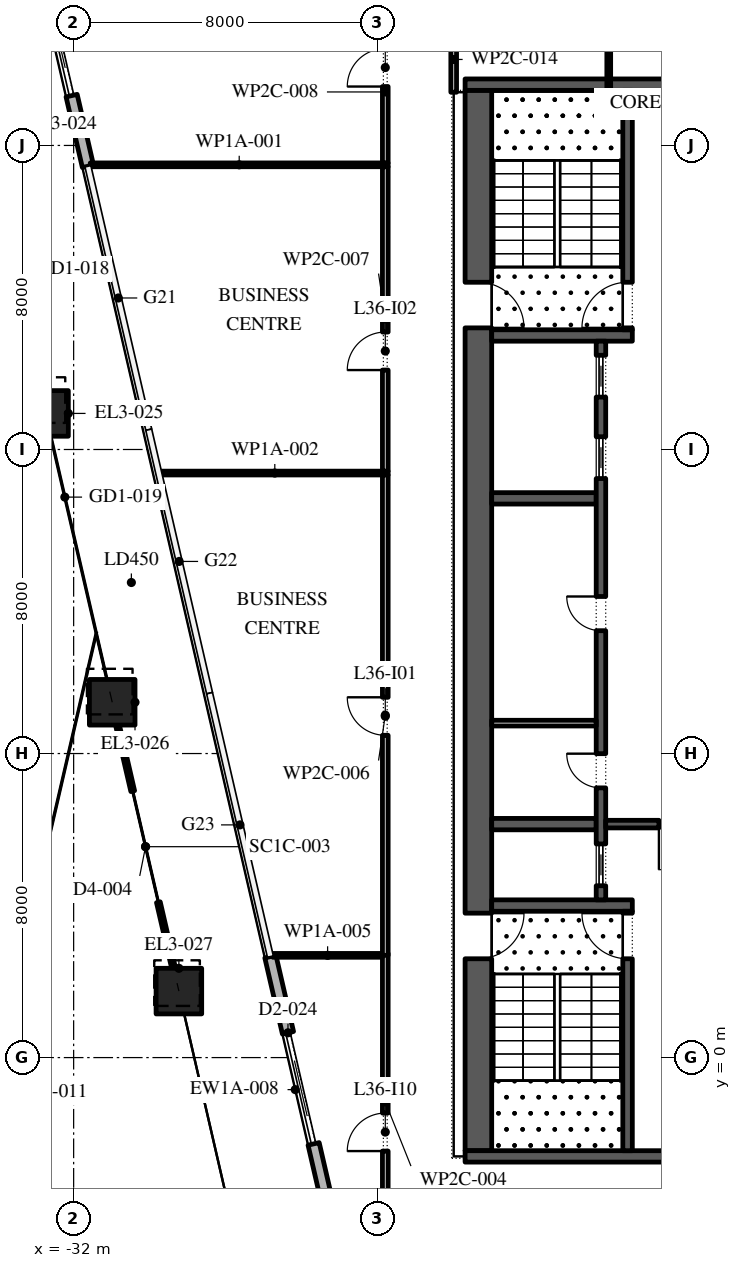
"""IFC4 building model, lengths in metres.
Left out: names, types, materials, properties, quantities, classifications, styles, units other than length and angle.
Written with IfcOpenShell. Run it as: python <this file> out.ifc"""

import sys

from ifc_helpers import new_model, si_unit, direction, frame, frame_2d, origin, origin_2d, place, context, subcontext, project, spatial, rectangle, extrude, element, fill, save


model = new_model("IFC4")
c1 = context("Model", 3, precision=1e-05, world=origin(), true_north=direction((0.0, 1.0)))
c2 = subcontext(c1, "Body", "Model", "MODEL_VIEW")
j1 = project(units=[si_unit("LENGTHUNIT", "METRE"), si_unit("PLANEANGLEUNIT", "RADIAN")], contexts=[c1])
p1 = place(None, origin())
s1 = spatial("IfcSite", under=j1, at=p1, CompositionType="ELEMENT")
p2 = place(p1, origin())
s2 = spatial("IfcBuilding", under=s1, at=p2, CompositionType="ELEMENT")
p3 = place(p2, frame((0.0, 0.0, 165.6)))
s3 = spatial("IfcBuildingStorey", under=s2, at=p3, CompositionType="ELEMENT", Elevation=165.6)
p4 = place(p3, frame((-32.74, 16.949, 0.0), z_axis=(-0.013484854004, 0.058366672302, 0.998204132569), x_axis=(-0.974334026589, -0.225107095913, 0.0)))
e1 = element("IfcColumn", 1, at=p4, inside=s3, PredefinedType="COLUMN", context=c2, shape_type="SweptSolid", body=[
    extrude(rectangle(XDim=1.2, YDim=1.2, at=origin_2d()), origin(), (0.0, 0.0, 1.0), 6.011),
])
p5 = place(p3, frame((-30.985, 9.349, 0.0), z_axis=(-0.010811105403, 0.046739741404, 0.99884859542), x_axis=(-0.974276841123, -0.225354469338, 0.0)))
e2 = element("IfcColumn", 2, at=p5, inside=s3, PredefinedType="COLUMN", context=c2, shape_type="SweptSolid", body=[
    extrude(rectangle(XDim=1.2, YDim=1.2, at=origin_2d()), origin(), (0.0, 0.0, 1.0), 6.007),
])
p6 = place(p3, frame((-29.231, 1.749, 0.0), z_axis=(-0.008092089508, 0.035052166613, 0.999352722367), x_axis=(-0.974372141151, -0.224942060428, 0.0)))
e3 = element("IfcColumn", 3, at=p6, inside=s3, PredefinedType="COLUMN", context=c2, shape_type="SweptSolid", body=[
    extrude(rectangle(XDim=1.2, YDim=1.2, at=origin_2d()), origin(), (0.0, 0.0, 1.0), 6.004),
])
p7 = place(p3, frame((-33.157, 30.092, 0.0), z_axis=(0.0, 0.0, 1.0), x_axis=(0.224961553766, -0.974367640743, 0.0)))
e4 = element("IfcWall", 4, at=p7, inside=s3, PredefinedType="STANDARD", context=c2, shape_type="SweptSolid", body=[
    extrude(rectangle(XDim=6.814, YDim=0.3, at=frame_2d((3.407, 0.0))), origin(), (0.0, 0.0, 1.0), 5.8),
])
p8 = place(p7, frame((1.907, 0.0, 0.0)))
e5 = element("IfcOpeningElement", 5, at=p8, cuts=e4, PredefinedType="OPENING", context=c2, shape_type="SweptSolid", body=[
    extrude(rectangle(XDim=3.0, YDim=3.5, at=frame_2d((1.5, 1.75))), frame((0.0, 0.16, 0.0), z_axis=(0.0, -1.0, 0.0), x_axis=(1.0, 0.0, 0.0)), (0.0, 0.0, 1.0), 0.32),
])
p9 = place(p3, frame((-26.823, 2.657, 0.0), z_axis=(0.0, 0.0, 1.0), x_axis=(0.22494221161, -0.974372106249, 0.0)))
e6 = element("IfcWall", 6, at=p9, inside=s3, PredefinedType="STANDARD", context=c2, shape_type="SweptSolid", body=[
    extrude(rectangle(XDim=7.115, YDim=0.3, at=frame_2d((3.557, 0.0))), origin(), (0.0, 0.0, 1.0), 5.8),
])
p10 = place(p9, frame((2.057, 0.0, 0.0)))
e7 = element("IfcOpeningElement", 7, at=p10, cuts=e6, PredefinedType="OPENING", context=c2, shape_type="SweptSolid", body=[
    extrude(rectangle(XDim=3.0, YDim=3.5, at=frame_2d((1.5, 1.75))), frame((0.0, 0.16, 0.0), z_axis=(0.0, -1.0, 0.0), x_axis=(1.0, 0.0, 0.0)), (0.0, 0.0, 1.0), 0.32),
])
p11 = place(p3, frame((-30.846, 8.745, 0.0), z_axis=(0.0, 0.0, 1.0), x_axis=(0.224973663593, -0.974364844752, 0.0)))
e8 = element("IfcWall", 8, at=p11, inside=s3, PredefinedType="STANDARD", context=c2, shape_type="SweptSolid", body=[
    extrude(rectangle(XDim=6.56, YDim=0.1, at=frame_2d((3.28, 0.0))), origin(), (0.0, 0.0, 1.0), 4.85),
])
p12 = place(p11, frame((1.78, 0.0, 0.0)))
e9 = element("IfcOpeningElement", 9, at=p12, cuts=e8, PredefinedType="OPENING", context=c2, shape_type="SweptSolid", body=[
    extrude(rectangle(XDim=3.0, YDim=3.5, at=frame_2d((1.5, 1.75))), frame((0.0, 0.06, 0.0), z_axis=(0.0, -1.0, 0.0), x_axis=(1.0, 0.0, 0.0)), (0.0, 0.0, 1.0), 0.12),
])
p13 = place(p3, frame((-21.35, -2.45, 0.0), z_axis=(0.0, 0.0, 1.0), x_axis=(0.0, 1.0, 0.0)))
e10 = element("IfcWall", 10, at=p13, inside=s3, PredefinedType="SHEAR", context=c2, shape_type="SweptSolid", body=[
    extrude(rectangle(XDim=27.9, YDim=0.7, at=frame_2d((13.95, 0.0))), origin(), (0.0, 0.0, 1.0), 5.8),
])
p14 = place(p13, frame((5.05, 0.0, 0.0)))
e11 = element("IfcOpeningElement", 11, at=p14, cuts=e10, PredefinedType="OPENING", context=c2, shape_type="SweptSolid", body=[
    extrude(rectangle(XDim=1.2, YDim=2.1, at=frame_2d((0.6, 1.05))), frame((0.0, 0.36, 0.0), z_axis=(0.0, -1.0, 0.0), x_axis=(1.0, 0.0, 0.0)), (0.0, 0.0, 1.0), 0.72),
])
p15 = place(p13, frame((21.65, 0.0, 0.0)))
e12 = element("IfcOpeningElement", 12, at=p15, cuts=e10, PredefinedType="OPENING", context=c2, shape_type="SweptSolid", body=[
    extrude(rectangle(XDim=1.2, YDim=2.1, at=frame_2d((0.6, 1.05))), frame((0.0, 0.36, 0.0), z_axis=(0.0, -1.0, 0.0), x_axis=(1.0, 0.0, 0.0)), (0.0, 0.0, 1.0), 0.72),
])
for number, where, z_axis, x_axis in (
    (13, (-21.7, -2.6, 0.0), (0.0, 0.0, 1.0), (1.0, 0.0, 0.0)),
    (14, (-21.7, 25.6, 0.0), (0.0, 0.0, 1.0), (1.0, 0.0, 0.0)),
):
    element("IfcWall", number, at=place(p3, frame(where, z_axis=z_axis, x_axis=x_axis)), inside=s3, PredefinedType="SHEAR", context=c2, shape_type="SweptSolid", body=[
        extrude(rectangle(XDim=11.4, YDim=0.3, at=frame_2d((5.7, 0.0))), origin(), (0.0, 0.0, 1.0), 5.8),
    ])
p16 = place(p3, frame((-21.0, 4.0, 0.0), z_axis=(0.0, 0.0, 1.0), x_axis=(1.0, 0.0, 0.0)))
e15 = element("IfcWall", 15, at=p16, inside=s3, PredefinedType="SHEAR", context=c2, shape_type="SweptSolid", body=[
    extrude(rectangle(XDim=3.7, YDim=0.3, at=frame_2d((1.85, 0.0))), origin(), (0.0, 0.0, 1.0), 5.8),
])
p17 = place(p3, frame((-17.425, -2.45, 0.0), z_axis=(0.0, 0.0, 1.0), x_axis=(0.0, 1.0, 0.0)))
e16 = element("IfcWall", 16, at=p17, inside=s3, PredefinedType="SHEAR", context=c2, shape_type="SweptSolid", body=[
    extrude(rectangle(XDim=6.3, YDim=0.25, at=frame_2d((3.15, 0.0))), origin(), (0.0, 0.0, 1.0), 5.8),
])
p18 = place(p17, frame((5.05, 0.0, 0.0)))
e17 = element("IfcOpeningElement", 17, at=p18, cuts=e16, PredefinedType="OPENING", context=c2, shape_type="SweptSolid", body=[
    extrude(rectangle(XDim=1.2, YDim=2.1, at=frame_2d((0.6, 1.05))), frame((0.0, 0.135, 0.0), z_axis=(0.0, -1.0, 0.0), x_axis=(1.0, 0.0, 0.0)), (0.0, 0.0, 1.0), 0.27),
])
p19 = place(p3, frame((-21.0, 19.0, 0.0), z_axis=(0.0, 0.0, 1.0), x_axis=(1.0, 0.0, 0.0)))
e18 = element("IfcWall", 18, at=p19, inside=s3, PredefinedType="SHEAR", context=c2, shape_type="SweptSolid", body=[
    extrude(rectangle(XDim=3.7, YDim=0.3, at=frame_2d((1.85, 0.0))), origin(), (0.0, 0.0, 1.0), 5.8),
])
p20 = place(p3, frame((-17.425, 19.15, 0.0), z_axis=(0.0, 0.0, 1.0), x_axis=(0.0, 1.0, 0.0)))
e19 = element("IfcWall", 19, at=p20, inside=s3, PredefinedType="SHEAR", context=c2, shape_type="SweptSolid", body=[
    extrude(rectangle(XDim=6.3, YDim=0.25, at=frame_2d((3.15, 0.0))), origin(), (0.0, 0.0, 1.0), 5.8),
])
p21 = place(p20, frame((0.05, 0.0, 0.0)))
e20 = element("IfcOpeningElement", 20, at=p21, cuts=e19, PredefinedType="OPENING", context=c2, shape_type="SweptSolid", body=[
    extrude(rectangle(XDim=1.2, YDim=2.1, at=frame_2d((0.6, 1.05))), frame((0.0, 0.135, 0.0), z_axis=(0.0, -1.0, 0.0), x_axis=(1.0, 0.0, 0.0)), (0.0, 0.0, 1.0), 0.27),
])
for number, where, z_axis, x_axis in (
    (21, (-21.0, 6.143, 0.0), (0.0, 0.0, 1.0), (1.0, 0.0, 0.0)),
    (22, (-21.0, 14.714, 0.0), (0.0, 0.0, 1.0), (1.0, 0.0, 0.0)),
):
    element("IfcWall", number, at=place(p3, frame(where, z_axis=z_axis, x_axis=x_axis)), inside=s3, PredefinedType="SHEAR", context=c2, shape_type="SweptSolid", body=[
        extrude(rectangle(XDim=2.75, YDim=0.3, at=frame_2d((1.375, 0.0))), origin(), (0.0, 0.0, 1.0), 5.8),
    ])
p22 = place(p3, frame((-18.125, 4.15, 0.0), z_axis=(0.0, 0.0, 1.0), x_axis=(0.0, 1.0, 0.0)))
e23 = element("IfcWall", 23, at=p22, inside=s3, PredefinedType="SHEAR", context=c2, shape_type="SweptSolid", body=[
    extrude(rectangle(XDim=14.7, YDim=0.25, at=frame_2d((7.35, 0.0))), origin(), (0.0, 0.0, 1.0), 5.8),
])
p23 = place(p22, frame((2.946, 0.0, 0.0)))
e24 = element("IfcOpeningElement", 24, at=p23, cuts=e23, PredefinedType="OPENING", context=c2, shape_type="SweptSolid", body=[
    extrude(rectangle(XDim=0.9, YDim=2.1, at=frame_2d((0.45, 1.05))), frame((0.0, 0.135, 0.0), z_axis=(0.0, -1.0, 0.0), x_axis=(1.0, 0.0, 0.0)), (0.0, 0.0, 1.0), 0.27),
])
p24 = place(p22, frame((7.082, 0.0, 0.0)))
e25 = element("IfcOpeningElement", 25, at=p24, cuts=e23, PredefinedType="OPENING", context=c2, shape_type="SweptSolid", body=[
    extrude(rectangle(XDim=0.9, YDim=2.1, at=frame_2d((0.45, 1.05))), frame((0.0, 0.135, 0.0), z_axis=(0.0, -1.0, 0.0), x_axis=(1.0, 0.0, 0.0)), (0.0, 0.0, 1.0), 0.27),
])
p25 = place(p22, frame((0.371, 0.0, 0.0)))
e26 = element("IfcOpeningElement", 26, at=p25, cuts=e23, PredefinedType="OPENING", context=c2, shape_type="SweptSolid", body=[
    extrude(rectangle(XDim=1.1, YDim=2.1, at=frame_2d((0.55, 1.05))), frame((0.0, 0.135, 0.0), z_axis=(0.0, -1.0, 0.0), x_axis=(1.0, 0.0, 0.0)), (0.0, 0.0, 1.0), 0.27),
])
p26 = place(p22, frame((11.086, 0.0, 0.0)))
e27 = element("IfcOpeningElement", 27, at=p26, cuts=e23, PredefinedType="OPENING", context=c2, shape_type="SweptSolid", body=[
    extrude(rectangle(XDim=1.1, YDim=2.1, at=frame_2d((0.55, 1.05))), frame((0.0, 0.135, 0.0), z_axis=(0.0, -1.0, 0.0), x_axis=(1.0, 0.0, 0.0)), (0.0, 0.0, 1.0), 0.27),
])
p27 = place(p22, frame((13.229, 0.0, 0.0)))
e28 = element("IfcOpeningElement", 28, at=p27, cuts=e23, PredefinedType="OPENING", context=c2, shape_type="SweptSolid", body=[
    extrude(rectangle(XDim=1.1, YDim=2.1, at=frame_2d((0.55, 1.05))), frame((0.0, 0.135, 0.0), z_axis=(0.0, -1.0, 0.0), x_axis=(1.0, 0.0, 0.0)), (0.0, 0.0, 1.0), 0.27),
])
p28 = place(p3, frame((-21.0, 8.8, 0.0), z_axis=(0.0, 0.0, 1.0), x_axis=(1.0, 0.0, 0.0)))
e29 = element("IfcWall", 29, at=p28, inside=s3, PredefinedType="PARTITIONING", context=c2, shape_type="SweptSolid", body=[
    extrude(rectangle(XDim=2.75, YDim=0.15, at=frame_2d((1.375, 0.0))), origin(), (0.0, 0.0, 1.0), 5.8),
])
p29 = place(p3, frame((-18.0, 6.143, 0.0), z_axis=(0.0, 0.0, 1.0), x_axis=(1.0, 0.0, 0.0)))
e30 = element("IfcWall", 30, at=p29, inside=s3, PredefinedType="SHEAR", context=c2, shape_type="SweptSolid", body=[
    extrude(rectangle(XDim=4.0, YDim=0.2, at=frame_2d((2.0, 0.0))), origin(), (0.0, 0.0, 1.0), 5.8),
])
p30 = place(p29, frame((1.4, 0.0, 0.0)))
e31 = element("IfcOpeningElement", 31, at=p30, cuts=e30, PredefinedType="OPENING", context=c2, shape_type="SweptSolid", body=[
    extrude(rectangle(XDim=1.2, YDim=2.1, at=frame_2d((0.6, 1.05))), frame((0.0, 0.11, 0.0), z_axis=(0.0, -1.0, 0.0), x_axis=(1.0, 0.0, 0.0)), (0.0, 0.0, 1.0), 0.22),
])
p31 = place(p3, frame((-31.562, 23.49, 0.0), z_axis=(0.0, 0.0, 1.0), x_axis=(1.0, 0.0, 0.0)))
e32 = element("IfcWall", 32, at=p31, inside=s3, PredefinedType="PARTITIONING", context=c2, shape_type="SweptSolid", body=[
    extrude(rectangle(XDim=7.837, YDim=0.1, at=frame_2d((3.918, 0.0))), origin(), (0.0, 0.0, 1.0), 5.8),
])
p32 = place(p3, frame((-29.689, 15.38, 0.0), z_axis=(0.0, 0.0, 1.0), x_axis=(1.0, 0.0, 0.0)))
e33 = element("IfcWall", 33, at=p32, inside=s3, PredefinedType="PARTITIONING", context=c2, shape_type="SweptSolid", body=[
    extrude(rectangle(XDim=5.964, YDim=0.1, at=frame_2d((2.982, 0.0))), origin(), (0.0, 0.0, 1.0), 5.8),
])
p33 = place(p3, frame((-23.8, -5.075, 0.0), z_axis=(0.0, 0.0, 1.0), x_axis=(0.0, 1.0, 0.0)))
e34 = element("IfcWall", 34, at=p33, inside=s3, PredefinedType="PARTITIONING", context=c2, shape_type="SweptSolid", body=[
    extrude(rectangle(XDim=7.815, YDim=0.15, at=frame_2d((3.907, 0.0))), origin(), (0.0, 0.0, 1.0), 5.8),
])
p34 = place(p33, frame((2.615, 0.0, 0.0)))
e35 = element("IfcOpeningElement", 35, at=p34, cuts=e34, PredefinedType="OPENING", context=c2, shape_type="SweptSolid", body=[
    extrude(rectangle(XDim=1.0, YDim=2.1, at=frame_2d((0.5, 1.05))), frame((0.0, 0.085, 0.0), z_axis=(0.0, -1.0, 0.0), x_axis=(1.0, 0.0, 0.0)), (0.0, 0.0, 1.0), 0.17),
])
p35 = place(p3, frame((-23.875, 2.69, 0.0), z_axis=(0.0, 0.0, 1.0), x_axis=(-1.0, 0.0, 0.0)))
e36 = element("IfcWall", 36, at=p35, inside=s3, PredefinedType="PARTITIONING", context=c2, shape_type="SweptSolid", body=[
    extrude(rectangle(XDim=2.885, YDim=0.1, at=frame_2d((1.442, 0.0))), origin(), (0.0, 0.0, 1.0), 5.8),
])
p36 = place(p3, frame((-23.8, 2.69, 0.0), z_axis=(0.0, 0.0, 1.0), x_axis=(0.0, 1.0, 0.0)))
e37 = element("IfcWall", 37, at=p36, inside=s3, PredefinedType="PARTITIONING", context=c2, shape_type="SweptSolid", body=[
    extrude(rectangle(XDim=12.64, YDim=0.15, at=frame_2d((6.32, 0.0))), origin(), (0.0, 0.0, 1.0), 5.8),
])
p37 = place(p36, frame((5.79, 0.0, 0.0)))
e38 = element("IfcOpeningElement", 38, at=p37, cuts=e37, PredefinedType="OPENING", context=c2, shape_type="SweptSolid", body=[
    extrude(rectangle(XDim=1.0, YDim=2.1, at=frame_2d((0.5, 1.05))), frame((0.0, 0.085, 0.0), z_axis=(0.0, -1.0, 0.0), x_axis=(1.0, 0.0, 0.0)), (0.0, 0.0, 1.0), 0.17),
])
p38 = place(p3, frame((-23.8, 15.43, 0.0), z_axis=(0.0, 0.0, 1.0), x_axis=(0.0, 1.0, 0.0)))
e39 = element("IfcWall", 39, at=p38, inside=s3, PredefinedType="PARTITIONING", context=c2, shape_type="SweptSolid", body=[
    extrude(rectangle(XDim=8.01, YDim=0.15, at=frame_2d((4.005, 0.0))), origin(), (0.0, 0.0, 1.0), 5.8),
])
p39 = place(p38, frame((2.66, 0.0, 0.0)))
e40 = element("IfcOpeningElement", 40, at=p39, cuts=e39, PredefinedType="OPENING", context=c2, shape_type="SweptSolid", body=[
    extrude(rectangle(XDim=1.0, YDim=2.1, at=frame_2d((0.5, 1.05))), frame((0.0, 0.085, 0.0), z_axis=(0.0, -1.0, 0.0), x_axis=(1.0, 0.0, 0.0)), (0.0, 0.0, 1.0), 0.17),
])
p40 = place(p3, frame((-23.8, 23.54, 0.0), z_axis=(0.0, 0.0, 1.0), x_axis=(0.0, 1.0, 0.0)))
e41 = element("IfcWall", 41, at=p40, inside=s3, PredefinedType="PARTITIONING", context=c2, shape_type="SweptSolid", body=[
    extrude(rectangle(XDim=3.735, YDim=0.15, at=frame_2d((1.867, 0.0))), origin(), (0.0, 0.0, 1.0), 5.8),
])
p41 = place(p40, frame((2.01, 0.0, 0.0)))
e42 = element("IfcOpeningElement", 42, at=p41, cuts=e41, PredefinedType="OPENING", context=c2, shape_type="SweptSolid", body=[
    extrude(rectangle(XDim=1.0, YDim=2.1, at=frame_2d((0.5, 1.05))), frame((0.0, 0.085, 0.0), z_axis=(0.0, -1.0, 0.0), x_axis=(1.0, 0.0, 0.0)), (0.0, 0.0, 1.0), 0.17),
])
p42 = place(p3, frame((-22.0, 27.125, 0.0), z_axis=(0.0, 0.0, 1.0), x_axis=(0.0, -1.0, 0.0)))
e43 = element("IfcWall", 43, at=p42, inside=s3, PredefinedType="PARTITIONING", context=c2, shape_type="SweptSolid", body=[
    extrude(rectangle(XDim=1.725, YDim=0.15, at=frame_2d((0.863, 0.0))), origin(), (0.0, 0.0, 1.0), 5.8),
])
p43 = place(p3, frame((-17.92, 25.4, 0.0), z_axis=(0.0, 0.0, 1.0), x_axis=(0.0, 1.0, 0.0)))
e44 = element("IfcWall", 44, at=p43, inside=s3, PredefinedType="PARTITIONING", context=c2, shape_type="SweptSolid", body=[
    extrude(rectangle(XDim=11.987, YDim=0.1, at=frame_2d((5.994, 0.0))), origin(), (0.0, 0.0, 1.0), 5.8),
])
p44 = place(p43, frame((4.36, 0.0, 0.0)))
e45 = element("IfcOpeningElement", 45, at=p44, cuts=e44, PredefinedType="OPENING", context=c2, shape_type="SweptSolid", body=[
    extrude(rectangle(XDim=0.9, YDim=2.1, at=frame_2d((0.45, 1.05))), frame((0.0, 0.06, 0.0), z_axis=(0.0, -1.0, 0.0), x_axis=(1.0, 0.0, 0.0)), (0.0, 0.0, 1.0), 0.12),
])
p45 = place(p8, origin())
e46 = element("IfcDoor", 46, at=p45, inside=s3, OperationType="DOUBLE_DOOR_SLIDING", PredefinedType="DOOR", context=c2, shape_type="SweptSolid", body=[
    extrude(rectangle(XDim=3.0, YDim=3.5, at=frame_2d((1.5, 1.75))), frame((0.0, 0.025, 0.0), z_axis=(0.0, -1.0, 0.0), x_axis=(1.0, 0.0, 0.0)), (0.0, 0.0, 1.0), 0.05),
])
fill(e5, e46)
p46 = place(p10, origin())
e47 = element("IfcDoor", 47, at=p46, inside=s3, OperationType="DOUBLE_DOOR_SLIDING", PredefinedType="DOOR", context=c2, shape_type="SweptSolid", body=[
    extrude(rectangle(XDim=3.0, YDim=3.5, at=frame_2d((1.5, 1.75))), frame((0.0, 0.025, 0.0), z_axis=(0.0, -1.0, 0.0), x_axis=(1.0, 0.0, 0.0)), (0.0, 0.0, 1.0), 0.05),
])
fill(e7, e47)
p47 = place(p12, origin())
e48 = element("IfcDoor", 48, at=p47, inside=s3, OperationType="DOUBLE_DOOR_SLIDING", PredefinedType="DOOR", context=c2, shape_type="SweptSolid", body=[
    extrude(rectangle(XDim=3.0, YDim=3.5, at=frame_2d((1.5, 1.75))), frame((0.0, 0.025, 0.0), z_axis=(0.0, -1.0, 0.0), x_axis=(1.0, 0.0, 0.0)), (0.0, 0.0, 1.0), 0.05),
])
fill(e9, e48)
p48 = place(p23, origin())
e49 = element("IfcDoor", 49, at=p48, inside=s3, OperationType="SINGLE_SWING_LEFT", PredefinedType="DOOR", context=c2, shape_type="SweptSolid", body=[
    extrude(rectangle(XDim=0.9, YDim=2.1, at=frame_2d((0.45, 1.05))), frame((0.0, 0.125, 0.0), z_axis=(0.0, -1.0, 0.0), x_axis=(1.0, 0.0, 0.0)), (0.0, 0.0, 1.0), 0.05),
])
fill(e24, e49)
p49 = place(p24, origin())
e50 = element("IfcDoor", 50, at=p49, inside=s3, OperationType="SINGLE_SWING_LEFT", PredefinedType="DOOR", context=c2, shape_type="SweptSolid", body=[
    extrude(rectangle(XDim=0.9, YDim=2.1, at=frame_2d((0.45, 1.05))), frame((0.0, 0.125, 0.0), z_axis=(0.0, -1.0, 0.0), x_axis=(1.0, 0.0, 0.0)), (0.0, 0.0, 1.0), 0.05),
])
fill(e25, e50)
p50 = place(p25, origin())
e51 = element("IfcDoor", 51, at=p50, inside=s3, OperationType="SLIDING_TO_LEFT", PredefinedType="DOOR", context=c2, shape_type="SweptSolid", body=[
    extrude(rectangle(XDim=1.1, YDim=2.1, at=frame_2d((0.55, 1.05))), frame((0.0, 0.025, 0.0), z_axis=(0.0, -1.0, 0.0), x_axis=(1.0, 0.0, 0.0)), (0.0, 0.0, 1.0), 0.05),
])
fill(e26, e51)
p51 = place(p26, origin())
e52 = element("IfcDoor", 52, at=p51, inside=s3, OperationType="SLIDING_TO_LEFT", PredefinedType="DOOR", context=c2, shape_type="SweptSolid", body=[
    extrude(rectangle(XDim=1.1, YDim=2.1, at=frame_2d((0.55, 1.05))), frame((0.0, 0.025, 0.0), z_axis=(0.0, -1.0, 0.0), x_axis=(1.0, 0.0, 0.0)), (0.0, 0.0, 1.0), 0.05),
])
fill(e27, e52)
p52 = place(p27, origin())
e53 = element("IfcDoor", 53, at=p52, inside=s3, OperationType="SLIDING_TO_LEFT", PredefinedType="DOOR", context=c2, shape_type="SweptSolid", body=[
    extrude(rectangle(XDim=1.1, YDim=2.1, at=frame_2d((0.55, 1.05))), frame((0.0, 0.025, 0.0), z_axis=(0.0, -1.0, 0.0), x_axis=(1.0, 0.0, 0.0)), (0.0, 0.0, 1.0), 0.05),
])
fill(e28, e53)
p53 = place(p30, frame((1.2, 0.0, 0.0), z_axis=(0.0, 0.0, 1.0), x_axis=(-1.0, 0.0, 0.0)))
e54 = element("IfcDoor", 54, at=p53, inside=s3, OperationType="SINGLE_SWING_LEFT", PredefinedType="DOOR", context=c2, shape_type="SweptSolid", body=[
    extrude(rectangle(XDim=1.2, YDim=2.1, at=frame_2d((0.6, 1.05))), frame((0.0, 0.025, 0.0), z_axis=(0.0, -1.0, 0.0), x_axis=(1.0, 0.0, 0.0)), (0.0, 0.0, 1.0), 0.05),
])
fill(e31, e54)
p54 = place(p18, origin())
e55 = element("IfcDoor", 55, at=p54, inside=s3, OperationType="SINGLE_SWING_LEFT", PredefinedType="DOOR", context=c2, shape_type="SweptSolid", body=[
    extrude(rectangle(XDim=1.2, YDim=2.1, at=frame_2d((0.6, 1.05))), frame((0.0, 0.025, 0.0), z_axis=(0.0, -1.0, 0.0), x_axis=(1.0, 0.0, 0.0)), (0.0, 0.0, 1.0), 0.05),
])
fill(e17, e55)
p55 = place(p14, frame((1.2, 0.0, 0.0), z_axis=(0.0, 0.0, 1.0), x_axis=(-1.0, 0.0, 0.0)))
e56 = element("IfcDoor", 56, at=p55, inside=s3, OperationType="SINGLE_SWING_RIGHT", PredefinedType="DOOR", context=c2, shape_type="SweptSolid", body=[
    extrude(rectangle(XDim=1.2, YDim=2.1, at=frame_2d((0.6, 1.05))), frame((0.0, 0.025, 0.0), z_axis=(0.0, -1.0, 0.0), x_axis=(1.0, 0.0, 0.0)), (0.0, 0.0, 1.0), 0.05),
])
fill(e11, e56)
p56 = place(p21, origin())
e57 = element("IfcDoor", 57, at=p56, inside=s3, OperationType="SINGLE_SWING_RIGHT", PredefinedType="DOOR", context=c2, shape_type="SweptSolid", body=[
    extrude(rectangle(XDim=1.2, YDim=2.1, at=frame_2d((0.6, 1.05))), frame((0.0, 0.025, 0.0), z_axis=(0.0, -1.0, 0.0), x_axis=(1.0, 0.0, 0.0)), (0.0, 0.0, 1.0), 0.05),
])
fill(e20, e57)
p57 = place(p15, frame((1.2, 0.0, 0.0), z_axis=(0.0, 0.0, 1.0), x_axis=(-1.0, 0.0, 0.0)))
e58 = element("IfcDoor", 58, at=p57, inside=s3, OperationType="SINGLE_SWING_LEFT", PredefinedType="DOOR", context=c2, shape_type="SweptSolid", body=[
    extrude(rectangle(XDim=1.2, YDim=2.1, at=frame_2d((0.6, 1.05))), frame((0.0, 0.025, 0.0), z_axis=(0.0, -1.0, 0.0), x_axis=(1.0, 0.0, 0.0)), (0.0, 0.0, 1.0), 0.05),
])
fill(e12, e58)
p58 = place(p37, origin())
e59 = element("IfcDoor", 59, at=p58, inside=s3, OperationType="SINGLE_SWING_LEFT", PredefinedType="DOOR", context=c2, shape_type="SweptSolid", body=[
    extrude(rectangle(XDim=1.0, YDim=2.1, at=frame_2d((0.5, 1.05))), frame((0.0, 0.025, 0.0), z_axis=(0.0, -1.0, 0.0), x_axis=(1.0, 0.0, 0.0)), (0.0, 0.0, 1.0), 0.05),
])
fill(e38, e59)
p59 = place(p39, origin())
e60 = element("IfcDoor", 60, at=p59, inside=s3, OperationType="SINGLE_SWING_RIGHT", PredefinedType="DOOR", context=c2, shape_type="SweptSolid", body=[
    extrude(rectangle(XDim=1.0, YDim=2.1, at=frame_2d((0.5, 1.05))), frame((0.0, 0.025, 0.0), z_axis=(0.0, -1.0, 0.0), x_axis=(1.0, 0.0, 0.0)), (0.0, 0.0, 1.0), 0.05),
])
fill(e40, e60)
p60 = place(p41, origin())
e61 = element("IfcDoor", 61, at=p60, inside=s3, OperationType="SINGLE_SWING_RIGHT", PredefinedType="DOOR", context=c2, shape_type="SweptSolid", body=[
    extrude(rectangle(XDim=1.0, YDim=2.1, at=frame_2d((0.5, 1.05))), frame((0.0, 0.025, 0.0), z_axis=(0.0, -1.0, 0.0), x_axis=(1.0, 0.0, 0.0)), (0.0, 0.0, 1.0), 0.05),
])
fill(e42, e61)
p61 = place(p34, origin())
e62 = element("IfcDoor", 62, at=p61, inside=s3, OperationType="SINGLE_SWING_RIGHT", PredefinedType="DOOR", context=c2, shape_type="SweptSolid", body=[
    extrude(rectangle(XDim=1.0, YDim=2.1, at=frame_2d((0.5, 1.05))), frame((0.0, 0.025, 0.0), z_axis=(0.0, -1.0, 0.0), x_axis=(1.0, 0.0, 0.0)), (0.0, 0.0, 1.0), 0.05),
])
fill(e35, e62)
save(model, sys.argv[1])
